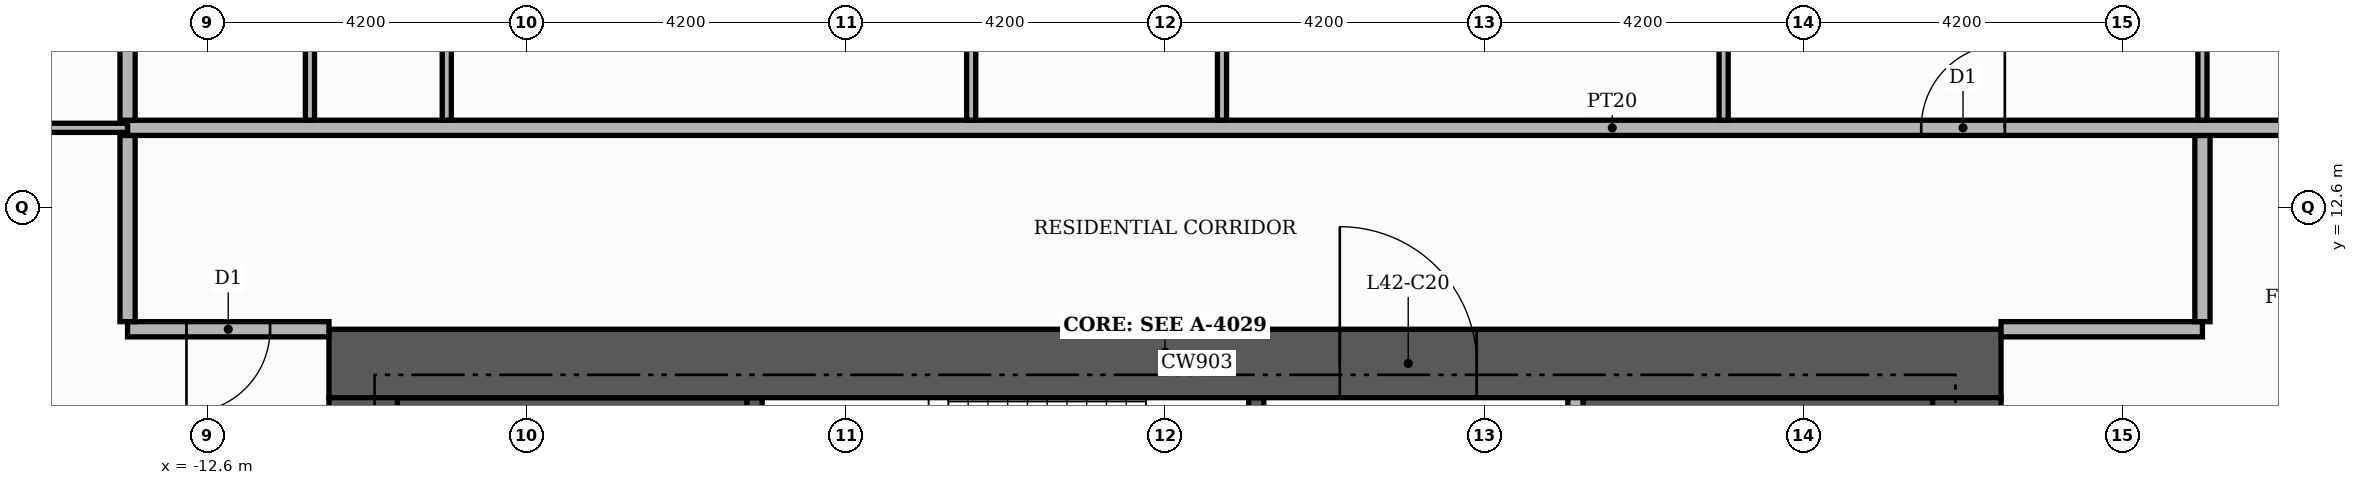
"""IFC4 building model, lengths in metres.
Left out: names, types, materials, properties, quantities, classifications, styles, units other than length and angle.
Written with IfcOpenShell. Run it as: python <this file> out.ifc"""

import sys

from ifc_helpers import new_model, si_unit, direction, frame, frame_2d, origin, place, context, subcontext, project, spatial, rectangle, extrude, element, fill, save


model = new_model("IFC4")
c1 = context("Model", 3, precision=1e-05, world=origin(), true_north=direction((0.0, 1.0)))
c2 = subcontext(c1, "Body", "Model", "MODEL_VIEW")
j1 = project(units=[si_unit("LENGTHUNIT", "METRE"), si_unit("PLANEANGLEUNIT", "RADIAN")], contexts=[c1])
p1 = place(None, origin())
s1 = spatial("IfcSite", under=j1, at=p1, CompositionType="ELEMENT")
p2 = place(p1, origin())
s2 = spatial("IfcBuilding", under=s1, at=p2, CompositionType="ELEMENT")
p3 = place(p2, frame((0.0, 0.0, 176.7)))
s3 = spatial("IfcBuildingStorey", under=s2, at=p3, CompositionType="ELEMENT", Elevation=176.7)
for number, where, z_axis, x_axis in (
    (1, (-10.1, 9.15, 0.0), (0.0, 0.0, 1.0), (1.0, 0.0, 0.0)),
    (2, (5.5, 9.15, 0.0), (0.0, 0.0, 1.0), (1.0, 0.0, 0.0)),
):
    element("IfcWall", number, at=place(p3, frame(where, z_axis=z_axis, x_axis=x_axis)), inside=s3, PredefinedType="SHEAR", context=c2, shape_type="SweptSolid", body=[
        extrude(rectangle(XDim=4.6, YDim=1.9, at=frame_2d((2.3, 0.0))), origin(), (0.0, 0.0, 1.0), 3.4),
    ])
p4 = place(p3, frame((-5.4, 7.25, 0.0), z_axis=(0.0, 0.0, 1.0), x_axis=(0.0, 1.0, 0.0)))
e3 = element("IfcWall", 3, at=p4, inside=s3, PredefinedType="SHEAR", context=c2, shape_type="SweptSolid", body=[
    extrude(rectangle(XDim=2.85, YDim=0.2, at=frame_2d((1.425, 0.0))), origin(), (0.0, 0.0, 1.0), 3.4),
])
p5 = place(p3, frame((1.2, 7.25, 0.0), z_axis=(0.0, 0.0, 1.0), x_axis=(0.0, 1.0, 0.0)))
e4 = element("IfcWall", 4, at=p5, inside=s3, PredefinedType="SHEAR", context=c2, shape_type="SweptSolid", body=[
    extrude(rectangle(XDim=2.85, YDim=0.2, at=frame_2d((1.425, 0.0))), origin(), (0.0, 0.0, 1.0), 3.4),
])
p6 = place(p5, frame((0.85, 0.0, 0.0)))
e5 = element("IfcOpeningElement", 5, at=p6, cuts=e4, PredefinedType="OPENING", context=c2, shape_type="SweptSolid", body=[
    extrude(rectangle(XDim=1.0, YDim=2.1, at=frame_2d((0.5, 1.05))), frame((0.0, 0.11, 0.0), z_axis=(0.0, -1.0, 0.0), x_axis=(1.0, 0.0, 0.0)), (0.0, 0.0, 1.0), 0.22),
])
p7 = place(p3, frame((-11.0, 10.55, 0.0), z_axis=(0.0, 0.0, 1.0), x_axis=(1.0, 0.0, 0.0)))
e6 = element("IfcWall", 6, at=p7, inside=s3, PredefinedType="SHEAR", context=c2, shape_type="SweptSolid", body=[
    extrude(rectangle(XDim=22.0, YDim=0.9, at=frame_2d((11.0, 0.0))), origin(), (0.0, 0.0, 1.0), 3.4),
])
p8 = place(p7, frame((13.3, 0.0, 0.0)))
e7 = element("IfcOpeningElement", 7, at=p8, cuts=e6, PredefinedType="OPENING", context=c2, shape_type="SweptSolid", body=[
    extrude(rectangle(XDim=1.8, YDim=2.2, at=frame_2d((0.9, 1.1))), frame((0.0, 0.46, 0.0), z_axis=(0.0, -1.0, 0.0), x_axis=(1.0, 0.0, 0.0)), (0.0, 0.0, 1.0), 0.92),
])
for number, where, z_axis, x_axis in (
    (8, (-10.55, -10.1, 0.0), (0.0, 0.0, 1.0), (0.0, 1.0, 0.0)),
    (9, (10.55, -10.1, 0.0), (0.0, 0.0, 1.0), (0.0, 1.0, 0.0)),
):
    element("IfcWall", number, at=place(p3, frame(where, z_axis=z_axis, x_axis=x_axis)), inside=s3, PredefinedType="SHEAR", context=c2, shape_type="SweptSolid", body=[
        extrude(rectangle(XDim=20.2, YDim=0.9, at=frame_2d((10.1, 0.0))), origin(), (0.0, 0.0, 1.0), 3.4),
    ])
p9 = place(p3, frame((5.4, 5.5, 0.0), z_axis=(0.0, 0.0, 1.0), x_axis=(0.0, 1.0, 0.0)))
e10 = element("IfcWall", 10, at=p9, inside=s3, PredefinedType="PARTITIONING", context=c2, shape_type="SweptSolid", body=[
    extrude(rectangle(XDim=4.6, YDim=0.2, at=frame_2d((2.3, 0.0))), origin(), (0.0, 0.0, 1.0), 3.4),
])
p10 = place(p9, frame((0.25, 0.0, 0.0)))
e11 = element("IfcOpeningElement", 11, at=p10, cuts=e10, PredefinedType="OPENING", context=c2, shape_type="SweptSolid", body=[
    extrude(rectangle(XDim=1.0, YDim=2.1, at=frame_2d((0.5, 1.05))), frame((0.0, 0.11, 0.0), z_axis=(0.0, -1.0, 0.0), x_axis=(1.0, 0.0, 0.0)), (0.0, 0.0, 1.0), 0.22),
])
p11 = place(p3, frame((-13.65, 11.0, 0.0), z_axis=(0.0, 0.0, 1.0), x_axis=(1.0, 0.0, 0.0)))
e12 = element("IfcWall", 12, at=p11, inside=s3, PredefinedType="PARTITIONING", context=c2, shape_type="SweptSolid", body=[
    extrude(rectangle(XDim=2.65, YDim=0.2, at=frame_2d((1.325, 0.0))), origin(), (0.0, 0.0, 1.0), 3.4),
])
p12 = place(p11, frame((0.775, 0.0, 0.0)))
e13 = element("IfcOpeningElement", 13, at=p12, cuts=e12, PredefinedType="OPENING", context=c2, shape_type="SweptSolid", body=[
    extrude(rectangle(XDim=1.1, YDim=2.4, at=frame_2d((0.55, 1.2))), frame((0.0, 0.11, 0.0), z_axis=(0.0, -1.0, 0.0), x_axis=(1.0, 0.0, 0.0)), (0.0, 0.0, 1.0), 0.22),
])
p13 = place(p3, frame((11.0, 11.0, 0.0), z_axis=(0.0, 0.0, 1.0), x_axis=(1.0, 0.0, 0.0)))
e14 = element("IfcWall", 14, at=p13, inside=s3, PredefinedType="PARTITIONING", context=c2, shape_type="SweptSolid", body=[
    extrude(rectangle(XDim=2.65, YDim=0.2, at=frame_2d((1.325, 0.0))), origin(), (0.0, 0.0, 1.0), 3.4),
])
for number, where, z_axis, x_axis in (
    (15, (-13.65, 11.1, 0.0), (0.0, 0.0, 1.0), (0.0, 1.0, 0.0)),
    (16, (13.65, 11.1, 0.0), (0.0, 0.0, 1.0), (0.0, 1.0, 0.0)),
):
    element("IfcWall", number, at=place(p3, frame(where, z_axis=z_axis, x_axis=x_axis)), inside=s3, PredefinedType="PARTITIONING", context=c2, shape_type="SweptSolid", body=[
        extrude(rectangle(XDim=2.45, YDim=0.2, at=frame_2d((1.225, 0.0))), origin(), (0.0, 0.0, 1.0), 3.4),
    ])
p14 = place(p3, frame((-20.72, 13.65, 0.0), z_axis=(0.0, 0.0, 1.0), x_axis=(1.0, 0.0, 0.0)))
e17 = element("IfcWall", 17, at=p14, inside=s3, PredefinedType="PARTITIONING", context=c2, shape_type="SweptSolid", body=[
    extrude(rectangle(XDim=7.07, YDim=0.12, at=frame_2d((3.535, 0.0))), origin(), (0.0, 0.0, 1.0), 3.4),
])
p15 = place(p14, frame((3.085, 0.0, 0.0)))
e18 = element("IfcOpeningElement", 18, at=p15, cuts=e17, PredefinedType="OPENING", context=c2, shape_type="SweptSolid", body=[
    extrude(rectangle(XDim=0.9, YDim=2.1, at=frame_2d((0.45, 1.05))), frame((0.0, 0.07, 0.0), z_axis=(0.0, -1.0, 0.0), x_axis=(1.0, 0.0, 0.0)), (0.0, 0.0, 1.0), 0.14),
])
p16 = place(p3, frame((-13.65, 13.65, 0.0), z_axis=(0.0, 0.0, 1.0), x_axis=(1.0, 0.0, 0.0)))
e19 = element("IfcWall", 19, at=p16, inside=s3, PredefinedType="PARTITIONING", context=c2, shape_type="SweptSolid", body=[
    extrude(rectangle(XDim=39.07, YDim=0.2, at=frame_2d((19.535, 0.0))), origin(), (0.0, 0.0, 1.0), 3.4),
])
p17 = place(p16, frame((23.6, 0.0, 0.0)))
e20 = element("IfcOpeningElement", 20, at=p17, cuts=e19, PredefinedType="OPENING", context=c2, shape_type="SweptSolid", body=[
    extrude(rectangle(XDim=1.1, YDim=2.4, at=frame_2d((0.55, 1.2))), frame((0.0, 0.11, 0.0), z_axis=(0.0, -1.0, 0.0), x_axis=(1.0, 0.0, 0.0)), (0.0, 0.0, 1.0), 0.22),
])
p18 = place(p3, frame((-13.65, 13.75, 0.0), z_axis=(0.0, 0.0, 1.0), x_axis=(0.0, 1.0, 0.0)))
e21 = element("IfcWall", 21, at=p18, inside=s3, PredefinedType="PARTITIONING", context=c2, shape_type="SweptSolid", body=[
    extrude(rectangle(XDim=6.67, YDim=0.2, at=frame_2d((3.335, 0.0))), origin(), (0.0, 0.0, 1.0), 3.4),
])
for number, where, z_axis, x_axis in (
    (22, (-11.25, 13.75, 0.0), (0.0, 0.0, 1.0), (0.0, 1.0, 0.0)),
    (23, (-9.45, 13.75, 0.0), (0.0, 0.0, 1.0), (0.0, 1.0, 0.0)),
    (24, (-2.55, 13.75, 0.0), (0.0, 0.0, 1.0), (0.0, 1.0, 0.0)),
    (25, (0.75, 13.75, 0.0), (0.0, 0.0, 1.0), (0.0, 1.0, 0.0)),
    (26, (7.35, 13.75, 0.0), (0.0, 0.0, 1.0), (0.0, 1.0, 0.0)),
):
    element("IfcWall", number, at=place(p3, frame(where, z_axis=z_axis, x_axis=x_axis)), inside=s3, PredefinedType="PARTITIONING", context=c2, shape_type="SweptSolid", body=[
        extrude(rectangle(XDim=5.11, YDim=0.12, at=frame_2d((2.555, 0.0))), origin(), (0.0, 0.0, 1.0), 3.4),
    ])
p19 = place(p3, frame((13.65, 13.75, 0.0), z_axis=(0.0, 0.0, 1.0), x_axis=(0.0, 1.0, 0.0)))
e27 = element("IfcWall", 27, at=p19, inside=s3, PredefinedType="PARTITIONING", context=c2, shape_type="SweptSolid", body=[
    extrude(rectangle(XDim=6.669, YDim=0.12, at=frame_2d((3.334, 0.0))), origin(), (0.0, 0.0, 1.0), 3.4),
])
p20 = place(p19, frame((2.834, 0.0, 0.0)))
e28 = element("IfcOpeningElement", 28, at=p20, cuts=e27, PredefinedType="OPENING", context=c2, shape_type="SweptSolid", body=[
    extrude(rectangle(XDim=0.9, YDim=2.1, at=frame_2d((0.45, 1.05))), frame((0.0, 0.07, 0.0), z_axis=(0.0, -1.0, 0.0), x_axis=(1.0, 0.0, 0.0)), (0.0, 0.0, 1.0), 0.14),
])
p21 = place(p8, origin())
e29 = element("IfcDoor", 29, at=p21, inside=s3, OperationType="DOUBLE_DOOR_SINGLE_SWING", PredefinedType="DOOR", context=c2, shape_type="SweptSolid", body=[
    extrude(rectangle(XDim=1.8, YDim=2.2, at=frame_2d((0.9, 1.1))), frame((0.0, 0.025, 0.0), z_axis=(0.0, -1.0, 0.0), x_axis=(1.0, 0.0, 0.0)), (0.0, 0.0, 1.0), 0.05),
])
fill(e7, e29)
p22 = place(p17, origin())
e30 = element("IfcDoor", 30, at=p22, inside=s3, OperationType="SINGLE_SWING_RIGHT", PredefinedType="DOOR", context=c2, shape_type="SweptSolid", body=[
    extrude(rectangle(XDim=1.1, YDim=2.4, at=frame_2d((0.55, 1.2))), frame((0.0, 0.025, 0.0), z_axis=(0.0, -1.0, 0.0), x_axis=(1.0, 0.0, 0.0)), (0.0, 0.0, 1.0), 0.05),
])
fill(e20, e30)
p23 = place(p12, frame((1.1, 0.0, 0.0), z_axis=(0.0, 0.0, 1.0), x_axis=(-1.0, 0.0, 0.0)))
e31 = element("IfcDoor", 31, at=p23, inside=s3, OperationType="SINGLE_SWING_LEFT", PredefinedType="DOOR", context=c2, shape_type="SweptSolid", body=[
    extrude(rectangle(XDim=1.1, YDim=2.4, at=frame_2d((0.55, 1.2))), frame((0.0, 0.025, 0.0), z_axis=(0.0, -1.0, 0.0), x_axis=(1.0, 0.0, 0.0)), (0.0, 0.0, 1.0), 0.05),
])
fill(e13, e31)
save(model, sys.argv[1])
